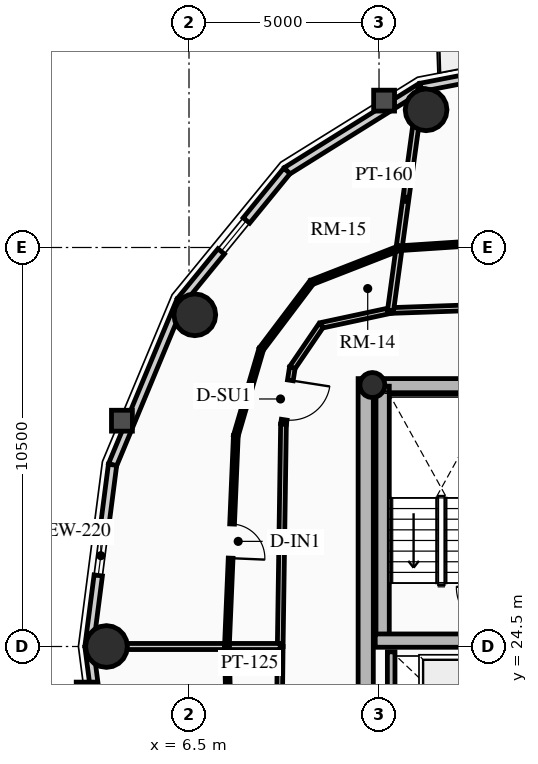
"""IFC4 building model, lengths in metres.
Left out: names, types, materials, properties, quantities, classifications, styles, units other than length and angle.
Written with IfcOpenShell. Run it as: python <this file> out.ifc"""

import sys

from ifc_helpers import new_model, si_unit, direction, frame, frame_2d, origin, origin_2d, place, context, subcontext, project, spatial, rectangle, circle, hollow_circle, extrude, source, transform, mapped, element, fill, save


model = new_model("IFC4")
c1 = context("Model", 3, precision=1e-05, world=origin(), true_north=direction((0.0, 1.0)))
c2 = subcontext(c1, "Body", "Model", "MODEL_VIEW")
j1 = project(units=[si_unit("LENGTHUNIT", "METRE"), si_unit("PLANEANGLEUNIT", "RADIAN")], contexts=[c1])
p1 = place(None, origin())
s1 = spatial("IfcSite", under=j1, at=p1, CompositionType="ELEMENT")
p2 = place(p1, origin())
s2 = spatial("IfcBuilding", under=s1, at=p2, CompositionType="ELEMENT")
p3 = place(p2, frame((0.0, 0.0, 222.85)))
s3 = spatial("IfcBuildingStorey", under=s2, at=p3, CompositionType="ELEMENT", Elevation=222.85)
p4 = place(p3, frame((11.15, 17.45, 0.0), z_axis=(0.0, 0.0, 1.0), x_axis=(0.0, 1.0, 0.0)))
e1 = element("IfcWall", 1, at=p4, inside=s3, PredefinedType="SHEAR", context=c2, shape_type="SweptSolid", body=[
    extrude(rectangle(XDim=14.1, YDim=0.4, at=frame_2d((7.05, 0.0))), origin(), (0.0, 0.0, 1.0), 3.2),
])
p5 = place(p3, frame((11.15, 31.35, 0.0), z_axis=(0.0, 0.0, 1.0), x_axis=(1.0, 0.0, 0.0)))
e2 = element("IfcWall", 2, at=p5, inside=s3, PredefinedType="SHEAR", context=c2, shape_type="SweptSolid", body=[
    extrude(rectangle(XDim=10.7, YDim=0.4, at=frame_2d((5.35, 0.0))), origin(), (0.0, 0.0, 1.0), 3.2),
])
m1 = source(origin(), c2, "Body", "SweptSolid", [
    extrude(rectangle(XDim=1.5, YDim=2.02, at=frame_2d((0.75, 1.01))), frame((0.0, 0.21, 0.0), z_axis=(0.0, -1.0, 0.0), x_axis=(1.0, 0.0, 0.0)), (0.0, 0.0, 1.0), 0.42),
])
p6 = place(p5, frame((4.6, 0.0, 0.0)))
e3 = element("IfcOpeningElement", 3, at=p6, cuts=e2, PredefinedType="OPENING", context=c2, shape_type="MappedRepresentation", body=[
    mapped(m1, transform((0.0, 0.0, 0.0), x_axis=(1.0, 0.0, 0.0), y_axis=(0.0, 1.0, 0.0), z_axis=(0.0, 0.0, 1.0), scale=1.0)),
])
p7 = place(p3, frame((11.595, 24.655, 0.0), z_axis=(0.0, 0.0, 1.0), x_axis=(0.0, 1.0, 0.0)))
e4 = element("IfcWall", 4, at=p7, inside=s3, PredefinedType="SHEAR", context=c2, shape_type="SweptSolid", body=[
    extrude(rectangle(XDim=6.695, YDim=0.35, at=frame_2d((3.348, 0.0))), origin(), (0.0, 0.0, 1.0), 3.2),
])
p8 = place(p3, frame((11.4, 24.655, 0.0), z_axis=(0.0, 0.0, 1.0), x_axis=(1.0, 0.0, 0.0)))
e5 = element("IfcWall", 5, at=p8, inside=s3, PredefinedType="SHEAR", context=c2, shape_type="SweptSolid", body=[
    extrude(rectangle(XDim=3.285, YDim=0.35, at=frame_2d((1.643, 0.0))), origin(), (0.0, 0.0, 1.0), 3.2),
])
p9 = place(p3, frame((11.325, 31.38, 0.0), z_axis=(0.0, 0.0, 1.0), x_axis=(1.0, 0.0, 0.0)))
e6 = element("IfcColumn", 6, at=p9, inside=s3, PredefinedType="COLUMN", context=c2, shape_type="SweptSolid", body=[
    extrude(hollow_circle(Radius=0.33, WallThickness=0.025, at=origin_2d()), origin(), (0.0, 0.0, 1.0), 3.2),
])
for number, where, z_axis, x_axis in (
    (7, (12.739, 38.623, 0.0), (0.0, 0.0, 1.0), (1.0, 0.0, 0.0)),
    (8, (6.653, 33.229, 0.0), (0.0, 0.0, 1.0), (1.0, 0.0, 0.0)),
    (9, (4.328, 24.5, 0.0), (0.0, 0.0, 1.0), (1.0, 0.0, 0.0)),
):
    element("IfcColumn", number, at=place(p3, frame(where, z_axis=z_axis, x_axis=x_axis)), inside=s3, PredefinedType="USERDEFINED", context=c2, shape_type="SweptSolid", body=[
        extrude(circle(Radius=0.55, at=origin_2d()), origin(), (0.0, 0.0, 1.0), 3.2),
    ])
p10 = place(p3, frame((12.597, 39.213, 0.0), z_axis=(0.0, 0.0, 1.0), x_axis=(0.981700307484, 0.190432419211, 0.0)))
e10 = element("IfcWall", 10, at=p10, inside=s3, PredefinedType="SOLIDWALL", context=c2, shape_type="SweptSolid", body=[
    extrude(rectangle(XDim=3.976, YDim=0.22, at=frame_2d((1.988, 0.0))), origin(), (0.0, 0.0, 1.0), 2.612),
])
m2 = source(origin(), c2, "Body", "SweptSolid", [
    extrude(rectangle(XDim=1.15, YDim=2.005, at=frame_2d((0.575, 1.002))), frame((0.0, 0.12, 0.0), z_axis=(0.0, -1.0, 0.0), x_axis=(1.0, 0.0, 0.0)), (0.0, 0.0, 1.0), 0.24),
])
p11 = place(p10, frame((1.413, 0.0, 0.0)))
e11 = element("IfcOpeningElement", 11, at=p11, cuts=e10, PredefinedType="OPENING", context=c2, shape_type="MappedRepresentation", body=[
    mapped(m2, transform((0.0, 0.0, 0.0), x_axis=(1.0, 0.0, 0.0), y_axis=(0.0, 1.0, 0.0), z_axis=(0.0, 0.0, 1.0), scale=1.0)),
])
p12 = place(p3, frame((9.076, 37.015, 0.0), z_axis=(0.0, 0.0, 1.0), x_axis=(0.848318713376, 0.529485939886, 0.0)))
e12 = element("IfcWall", 12, at=p12, inside=s3, PredefinedType="SOLIDWALL", context=c2, shape_type="SweptSolid", body=[
    extrude(rectangle(XDim=4.15, YDim=0.22, at=frame_2d((2.075, 0.0))), origin(), (0.0, 0.0, 1.0), 2.612),
])
p13 = place(p3, frame((6.282, 33.593, 0.0), z_axis=(0.0, 0.0, 1.0), x_axis=(0.632467166636, 0.774587169483, 0.0)))
e13 = element("IfcWall", 13, at=p13, inside=s3, PredefinedType="SOLIDWALL", context=c2, shape_type="SweptSolid", body=[
    extrude(rectangle(XDim=4.418, YDim=0.22, at=frame_2d((2.209, 0.0))), origin(), (0.0, 0.0, 1.0), 2.612),
])
m3 = source(origin(), c2, "Body", "SweptSolid", [
    extrude(rectangle(XDim=1.05, YDim=1.3, at=frame_2d((0.525, 0.65))), frame((0.0, 0.12, 0.0), z_axis=(0.0, -1.0, 0.0), x_axis=(1.0, 0.0, 0.0)), (0.0, 0.0, 1.0), 0.24),
])
p14 = place(p13, frame((1.684, 0.0, 0.65)))
e14 = element("IfcOpeningElement", 14, at=p14, cuts=e13, PredefinedType="OPENING", context=c2, shape_type="MappedRepresentation", body=[
    mapped(m3, transform((0.0, 0.0, 0.0), x_axis=(1.0, 0.0, 0.0), y_axis=(0.0, 1.0, 0.0), z_axis=(0.0, 0.0, 1.0), scale=1.0)),
])
p15 = place(p3, frame((4.488, 29.281, 0.0), z_axis=(0.0, 0.0, 1.0), x_axis=(0.384036305194, 0.923317993052, 0.0)))
e15 = element("IfcWall", 15, at=p15, inside=s3, PredefinedType="SOLIDWALL", context=c2, shape_type="SweptSolid", body=[
    extrude(rectangle(XDim=4.671, YDim=0.22, at=frame_2d((2.335, 0.0))), origin(), (0.0, 0.0, 1.0), 2.612),
])
p16 = place(p3, frame((3.87, 24.5, 0.0), z_axis=(0.0, 0.0, 1.0), x_axis=(0.128241318541, 0.991742993027, 0.0)))
e16 = element("IfcWall", 16, at=p16, inside=s3, PredefinedType="SOLIDWALL", context=c2, shape_type="SweptSolid", body=[
    extrude(rectangle(XDim=4.82, YDim=0.22, at=frame_2d((2.41, 0.0))), origin(), (0.0, 0.0, 1.0), 2.612),
])
p17 = place(p16, frame((1.885, 0.0, 0.65)))
e17 = element("IfcOpeningElement", 17, at=p17, cuts=e16, PredefinedType="OPENING", context=c2, shape_type="MappedRepresentation", body=[
    mapped(m3, transform((0.0, 0.0, 0.0), x_axis=(1.0, 0.0, 0.0), y_axis=(0.0, 1.0, 0.0), z_axis=(0.0, 0.0, 1.0), scale=1.0)),
])
p18 = place(p3, frame((4.488, 19.719, 0.0), z_axis=(0.0, 0.0, 1.0), x_axis=(-0.128241318541, 0.991742993027, 0.0)))
e18 = element("IfcWall", 18, at=p18, inside=s3, PredefinedType="SOLIDWALL", context=c2, shape_type="SweptSolid", body=[
    extrude(rectangle(XDim=4.82, YDim=0.22, at=frame_2d((2.41, 0.0))), origin(), (0.0, 0.0, 1.0), 2.612),
])
p19 = place(p3, frame((11.82, 21.92, 0.0), z_axis=(0.0, 0.0, 1.0), x_axis=(0.0, 1.0, 0.0)))
e19 = element("IfcWall", 19, at=p19, inside=s3, PredefinedType="SHEAR", context=c2, shape_type="SweptSolid", body=[
    extrude(rectangle(XDim=2.44, YDim=0.2, at=frame_2d((1.22, 0.0))), origin(), (0.0, 0.0, 1.0), 3.2),
])
p20 = place(p3, frame((18.082, 33.56, 0.0), z_axis=(0.0, 0.0, 1.0), x_axis=(-0.999399009709, -0.034664382185, 0.0)))
e20 = element("IfcWall", 20, at=p20, inside=s3, PredefinedType="PARTITIONING", context=c2, shape_type="SweptSolid", body=[
    extrude(rectangle(XDim=6.282, YDim=0.15, at=frame_2d((3.141, 0.0))), origin(), (0.0, 0.0, 1.0), 2.545),
])
p21 = place(p3, frame((11.803, 33.342, 0.0), z_axis=(0.0, 0.0, 1.0), x_axis=(-0.977750742783, -0.209770076483, 0.0)))
e21 = element("IfcWall", 21, at=p21, inside=s3, PredefinedType="PARTITIONING", context=c2, shape_type="SweptSolid", body=[
    extrude(rectangle(XDim=1.868, YDim=0.15, at=frame_2d((0.934, 0.0))), origin(), (0.0, 0.0, 1.0), 2.545),
])
p22 = place(p3, frame((9.977, 32.95, 0.0), z_axis=(0.0, 0.0, 1.0), x_axis=(-0.563291804539, -0.826258036535, 0.0)))
e22 = element("IfcWall", 22, at=p22, inside=s3, PredefinedType="PARTITIONING", context=c2, shape_type="SweptSolid", body=[
    extrude(rectangle(XDim=1.346, YDim=0.15, at=frame_2d((0.673, 0.0))), origin(), (0.0, 0.0, 1.0), 2.612),
])
p23 = place(p3, frame((9.219, 31.838, 0.0), z_axis=(0.0, 0.0, 1.0), x_axis=(-0.154065528966, -0.98806063214, 0.0)))
e23 = element("IfcWall", 23, at=p23, inside=s3, PredefinedType="PARTITIONING", context=c2, shape_type="SweptSolid", body=[
    extrude(rectangle(XDim=1.507, YDim=0.15, at=frame_2d((0.753, 0.0))), origin(), (0.0, 0.0, 1.0), 2.545),
])
m4 = source(origin(), c2, "Body", "SweptSolid", [
    extrude(rectangle(XDim=1.05, YDim=2.015, at=frame_2d((0.525, 1.007))), frame((0.0, 0.085, 0.0), z_axis=(0.0, -1.0, 0.0), x_axis=(1.0, 0.0, 0.0)), (0.0, 0.0, 1.0), 0.17),
])
p24 = place(p23, frame((0.337, 0.0, 0.0)))
e24 = element("IfcOpeningElement", 24, at=p24, cuts=e23, PredefinedType="OPENING", context=c2, shape_type="MappedRepresentation", body=[
    mapped(m4, transform((0.0, 0.0, 0.0), x_axis=(1.0, 0.0, 0.0), y_axis=(0.0, 1.0, 0.0), z_axis=(0.0, 0.0, 1.0), scale=1.0)),
])
p25 = place(p3, frame((8.986, 30.349, 0.0), z_axis=(0.0, 0.0, 1.0), x_axis=(-0.014775478218, -0.999890836663, 0.0)))
e25 = element("IfcWall", 25, at=p25, inside=s3, PredefinedType="PARTITIONING", context=c2, shape_type="SweptSolid", body=[
    extrude(rectangle(XDim=5.849, YDim=0.15, at=frame_2d((2.925, 0.0))), origin(), (0.0, 0.0, 1.0), 2.975),
])
p26 = place(p3, frame((8.9, 24.5, 0.0), z_axis=(0.0, 0.0, 1.0), x_axis=(-0.011416369353, -0.999934831132, 0.0)))
e26 = element("IfcWall", 26, at=p26, inside=s3, PredefinedType="PARTITIONING", context=c2, shape_type="SweptSolid", body=[
    extrude(rectangle(XDim=5.967, YDim=0.15, at=frame_2d((2.983, 0.0))), origin(), (0.0, 0.0, 1.0), 2.612),
])
p27 = place(p3, frame((11.803, 33.342, 0.0), z_axis=(0.0, 0.0, 1.0), x_axis=(0.135452591041, 0.990783828885, 0.0)))
e27 = element("IfcWall", 27, at=p27, inside=s3, PredefinedType="PARTITIONING", context=c2, shape_type="SweptSolid", body=[
    extrude(rectangle(XDim=5.906, YDim=0.16, at=frame_2d((2.953, 0.0))), origin(), (0.0, 0.0, 1.0), 2.612),
])
p28 = place(p3, frame((8.9, 24.5, 0.0), z_axis=(0.0, 0.0, 1.0), x_axis=(-1.0, 0.0, 0.0)))
e28 = element("IfcWall", 28, at=p28, inside=s3, PredefinedType="PARTITIONING", context=c2, shape_type="SweptSolid", body=[
    extrude(rectangle(XDim=5.01, YDim=0.16, at=frame_2d((2.505, 0.0))), origin(), (0.0, 0.0, 1.0), 2.612),
])
p29 = place(p3, frame((17.639, 35.349, 0.0), z_axis=(0.0, 0.0, 1.0), x_axis=(-0.997849042159, -0.065553711275, 0.0)))
e29 = element("IfcWall", 29, at=p29, inside=s3, PredefinedType="PARTITIONING", context=c2, shape_type="SweptSolid", body=[
    extrude(rectangle(XDim=5.624, YDim=0.125, at=frame_2d((2.812, 0.0))), origin(), (0.0, 0.0, 1.0), 2.545),
])
m5 = source(origin(), c2, "Body", "SweptSolid", [
    extrude(rectangle(XDim=0.9, YDim=2.005, at=frame_2d((0.45, 1.002))), frame((0.0, 0.073, 0.0), z_axis=(0.0, -1.0, 0.0), x_axis=(1.0, 0.0, 0.0)), (0.0, 0.0, 1.0), 0.145),
])
p30 = place(p29, frame((2.362, 0.0, 0.0)))
e30 = element("IfcOpeningElement", 30, at=p30, cuts=e29, PredefinedType="OPENING", context=c2, shape_type="MappedRepresentation", body=[
    mapped(m5, transform((0.0, 0.0, 0.0), x_axis=(1.0, 0.0, 0.0), y_axis=(0.0, 1.0, 0.0), z_axis=(0.0, 0.0, 1.0), scale=1.0)),
])
p31 = place(p3, frame((12.027, 34.98, 0.0), z_axis=(0.0, 0.0, 1.0), x_axis=(-0.931701760683, -0.363224213317, 0.0)))
e31 = element("IfcWall", 31, at=p31, inside=s3, PredefinedType="PARTITIONING", context=c2, shape_type="SweptSolid", body=[
    extrude(rectangle(XDim=2.468, YDim=0.125, at=frame_2d((1.234, 0.0))), origin(), (0.0, 0.0, 1.0), 2.545),
])
p32 = place(p3, frame((9.728, 34.084, 0.0), z_axis=(0.0, 0.0, 1.0), x_axis=(-0.602426891997, -0.798174066103, 0.0)))
e32 = element("IfcWall", 32, at=p32, inside=s3, PredefinedType="PARTITIONING", context=c2, shape_type="SweptSolid", body=[
    extrude(rectangle(XDim=2.203, YDim=0.125, at=frame_2d((1.101, 0.0))), origin(), (0.0, 0.0, 1.0), 2.612),
])
p33 = place(p3, frame((8.401, 32.326, 0.0), z_axis=(0.0, 0.0, 1.0), x_axis=(-0.281681886596, -0.959507850288, 0.0)))
e33 = element("IfcWall", 33, at=p33, inside=s3, PredefinedType="PARTITIONING", context=c2, shape_type="SweptSolid", body=[
    extrude(rectangle(XDim=2.374, YDim=0.125, at=frame_2d((1.187, 0.0))), origin(), (0.0, 0.0, 1.0), 2.545),
])
p34 = place(p3, frame((7.732, 30.048, 0.0), z_axis=(0.0, 0.0, 1.0), x_axis=(-0.042296211955, -0.999105114817, 0.0)))
e34 = element("IfcWall", 34, at=p34, inside=s3, PredefinedType="PARTITIONING", context=c2, shape_type="SweptSolid", body=[
    extrude(rectangle(XDim=5.553, YDim=0.125, at=frame_2d((2.776, 0.0))), origin(), (0.0, 0.0, 1.0), 2.975),
])
p35 = place(p34, frame((2.326, 0.0, 0.0)))
e35 = element("IfcOpeningElement", 35, at=p35, cuts=e34, PredefinedType="OPENING", context=c2, shape_type="MappedRepresentation", body=[
    mapped(m5, transform((0.0, 0.0, 0.0), x_axis=(1.0, 0.0, 0.0), y_axis=(0.0, 1.0, 0.0), z_axis=(0.0, 0.0, 1.0), scale=1.0)),
])
p36 = place(p3, frame((7.497, 24.5, 0.0), z_axis=(0.0, 0.0, 1.0), x_axis=(0.021927972859, -0.999759553096, 0.0)))
e36 = element("IfcWall", 36, at=p36, inside=s3, PredefinedType="PARTITIONING", context=c2, shape_type="SweptSolid", body=[
    extrude(rectangle(XDim=5.634, YDim=0.125, at=frame_2d((2.817, 0.0))), origin(), (0.0, 0.0, 1.0), 2.612),
])
p37 = place(p36, frame((2.367, 0.0, 0.0)))
e37 = element("IfcOpeningElement", 37, at=p37, cuts=e36, PredefinedType="OPENING", context=c2, shape_type="MappedRepresentation", body=[
    mapped(m5, transform((0.0, 0.0, 0.0), x_axis=(1.0, 0.0, 0.0), y_axis=(0.0, 1.0, 0.0), z_axis=(0.0, 0.0, 1.0), scale=1.0)),
])
m6 = source(origin(), c2, "Body", "SweptSolid", [
    extrude(rectangle(XDim=1.05, YDim=1.3, at=frame_2d((0.525, 0.65))), frame((0.0, 0.03, 0.0), z_axis=(0.0, -1.0, 0.0), x_axis=(1.0, 0.0, 0.0)), (0.0, 0.0, 1.0), 0.06),
])
p38 = place(p14, origin())
e38 = element("IfcWindow", 38, at=p38, inside=s3, PartitioningType="SINGLE_PANEL", PredefinedType="WINDOW", context=c2, shape_type="MappedRepresentation", body=[
    mapped(m6, transform((0.0, 0.0, 0.0), x_axis=(1.0, 0.0, 0.0), y_axis=(0.0, 1.0, 0.0), z_axis=(0.0, 0.0, 1.0), scale=1.0)),
])
fill(e14, e38)
p39 = place(p17, origin())
e39 = element("IfcWindow", 39, at=p39, inside=s3, PartitioningType="SINGLE_PANEL", PredefinedType="WINDOW", context=c2, shape_type="MappedRepresentation", body=[
    mapped(m6, transform((0.0, 0.0, 0.0), x_axis=(1.0, 0.0, 0.0), y_axis=(0.0, 1.0, 0.0), z_axis=(0.0, 0.0, 1.0), scale=1.0)),
])
fill(e17, e39)
m7 = source(origin(), c2, "Body", "SweptSolid", [
    extrude(rectangle(XDim=1.05, YDim=2.015, at=frame_2d((0.525, 1.007))), frame((0.0, 0.025, 0.0), z_axis=(0.0, -1.0, 0.0), x_axis=(1.0, 0.0, 0.0)), (0.0, 0.0, 1.0), 0.05),
])
p40 = place(p24, origin())
e40 = element("IfcDoor", 40, at=p40, inside=s3, OperationType="SINGLE_SWING_LEFT", PredefinedType="DOOR", context=c2, shape_type="MappedRepresentation", body=[
    mapped(m7, transform((0.0, 0.0, 0.0), x_axis=(1.0, 0.0, 0.0), y_axis=(0.0, 1.0, 0.0), z_axis=(0.0, 0.0, 1.0), scale=1.0)),
])
fill(e24, e40)
m8 = source(origin(), c2, "Body", "SweptSolid", [
    extrude(rectangle(XDim=0.9, YDim=2.005, at=frame_2d((0.45, 1.002))), frame((0.0, 0.025, 0.0), z_axis=(0.0, -1.0, 0.0), x_axis=(1.0, 0.0, 0.0)), (0.0, 0.0, 1.0), 0.05),
])
p41 = place(p35, origin())
e41 = element("IfcDoor", 41, at=p41, inside=s3, OperationType="SINGLE_SWING_RIGHT", PredefinedType="DOOR", context=c2, shape_type="MappedRepresentation", body=[
    mapped(m8, transform((0.0, 0.0, 0.0), x_axis=(1.0, 0.0, 0.0), y_axis=(0.0, 1.0, 0.0), z_axis=(0.0, 0.0, 1.0), scale=1.0)),
])
fill(e35, e41)
save(model, sys.argv[1])
